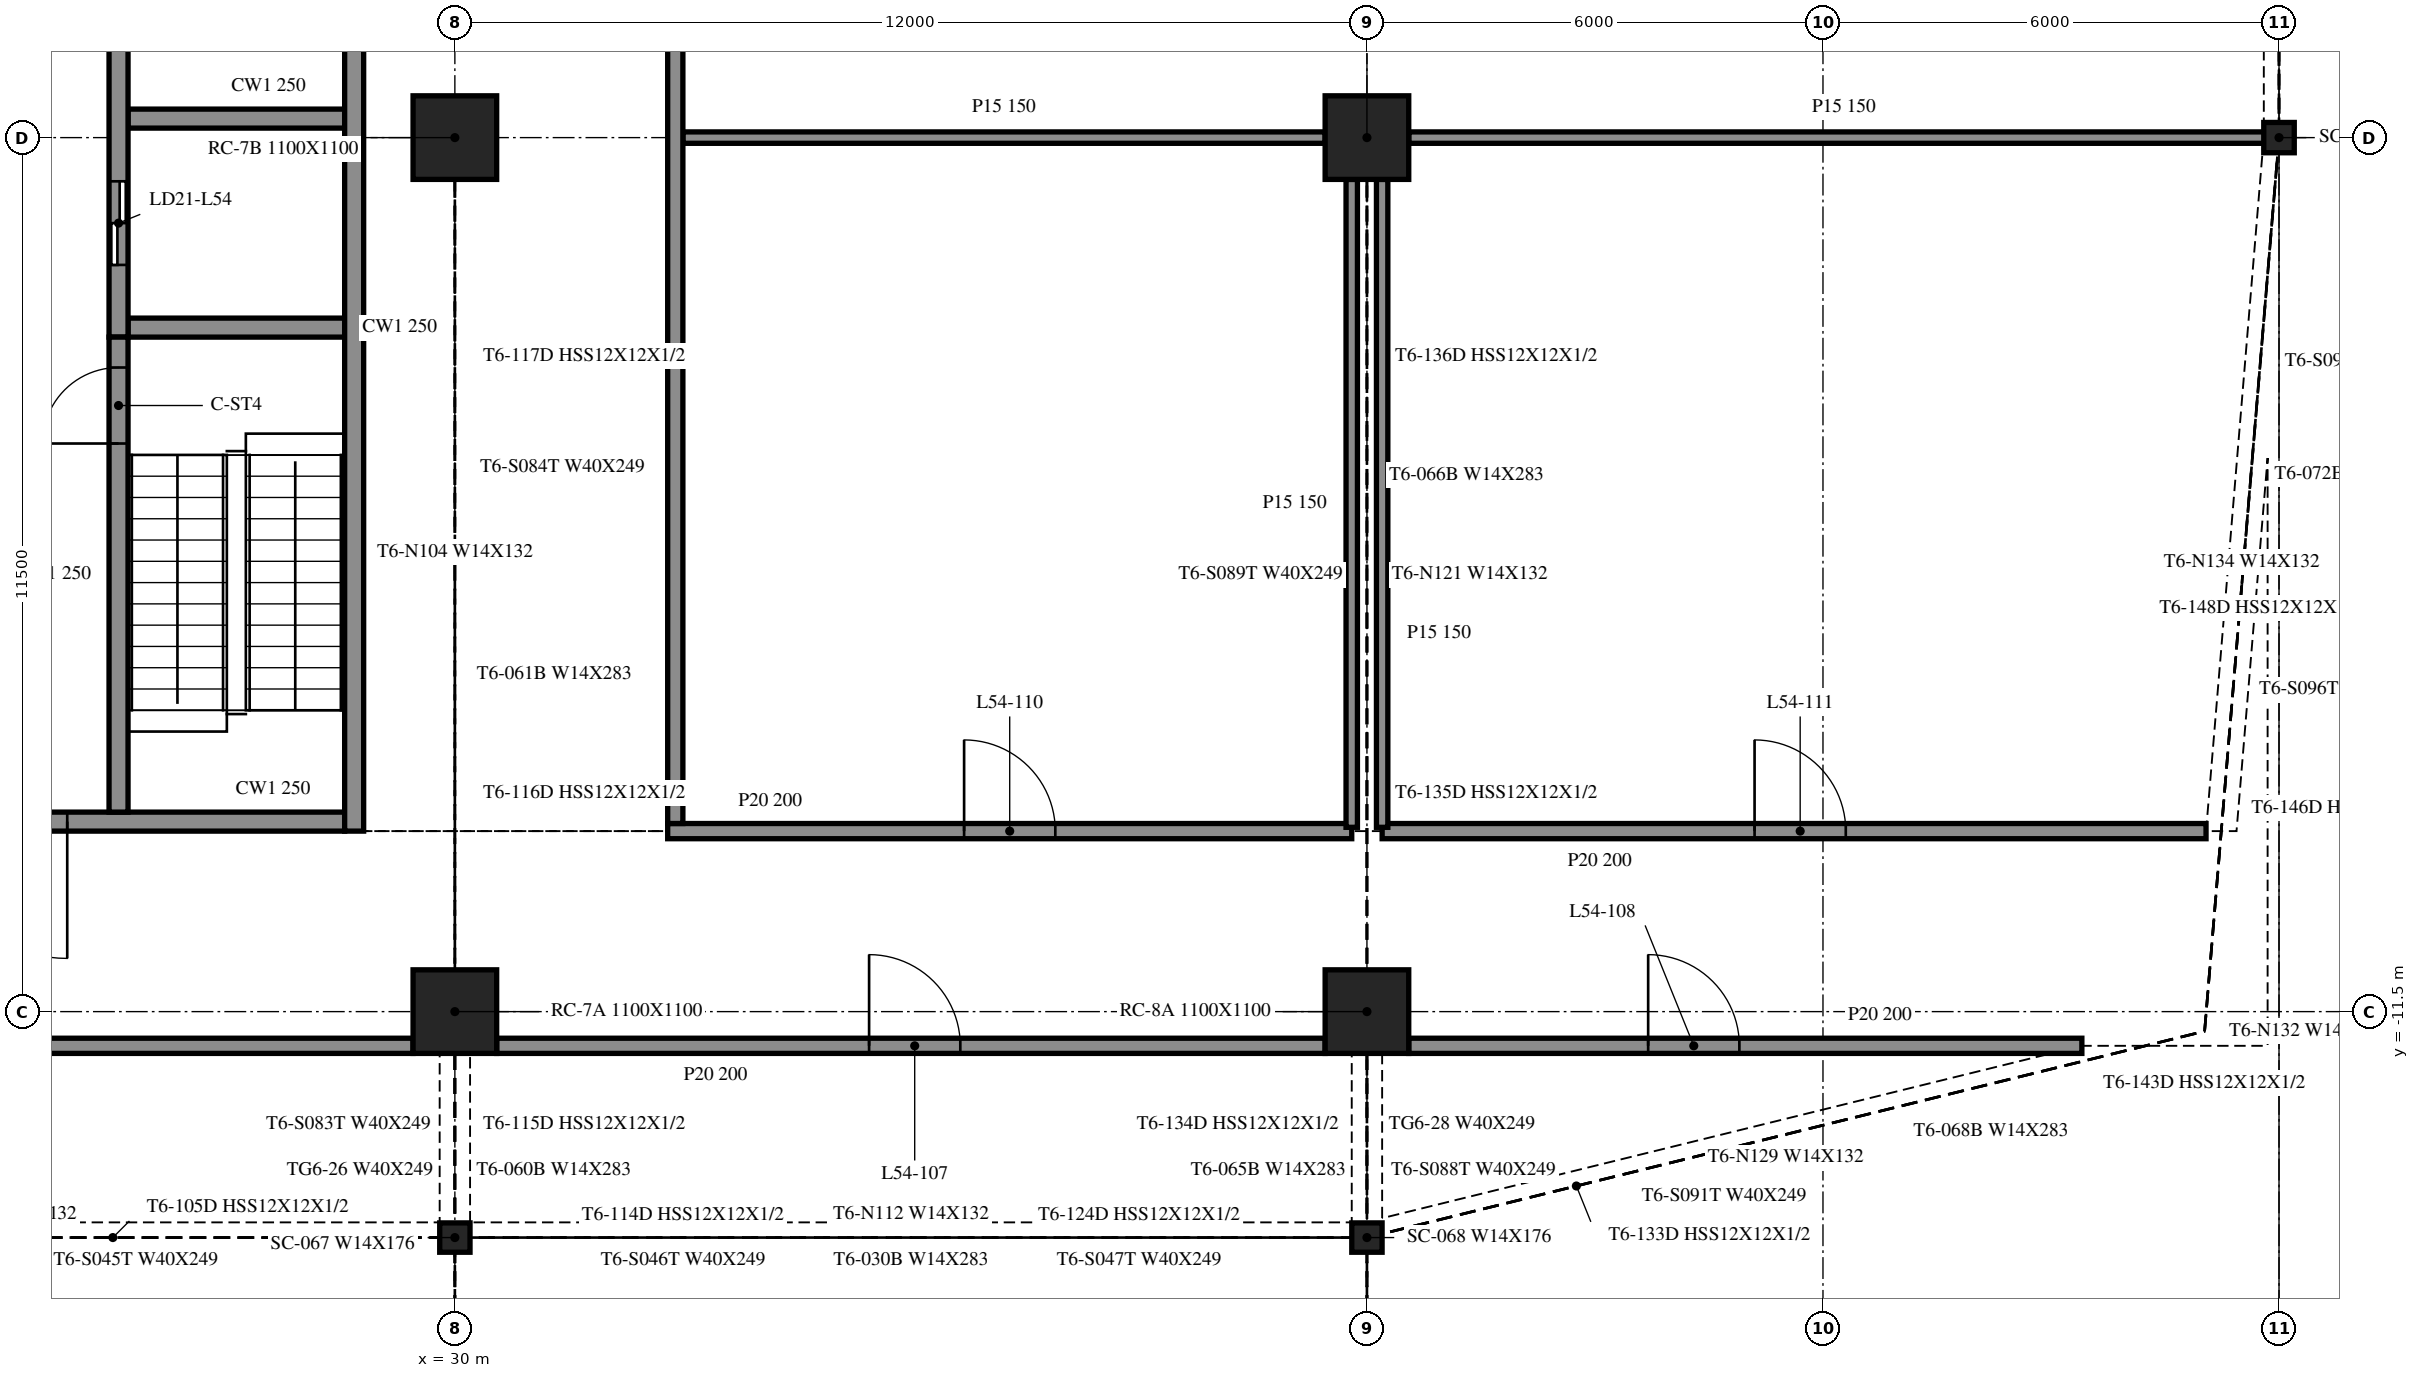
"""IFC4 building model, lengths in metres.
Left out: names, types, materials, properties, quantities, classifications, styles, units other than length and angle.
Written with IfcOpenShell. Run it as: python <this file> out.ifc"""

import sys

from ifc_helpers import new_model, si_unit, direction, frame, frame_2d, origin, origin_2d, place, context, subcontext, project, spatial, rectangle, i_section, extrude, element, fill, save


model = new_model("IFC4")
c1 = context("Model", 3, precision=1e-05, world=origin(), true_north=direction((0.0, 1.0)))
c2 = subcontext(c1, "Body", "Model", "MODEL_VIEW")
j1 = project(units=[si_unit("LENGTHUNIT", "METRE"), si_unit("PLANEANGLEUNIT", "RADIAN")], contexts=[c1])
p1 = place(None, origin())
s1 = spatial("IfcSite", under=j1, at=p1, CompositionType="ELEMENT")
p2 = place(p1, origin())
s2 = spatial("IfcBuilding", under=s1, at=p2, CompositionType="ELEMENT")
p3 = place(p2, frame((0.0, 0.0, 224.3)))
s3 = spatial("IfcBuildingStorey", under=s2, at=p3, CompositionType="ELEMENT", Elevation=224.3)
for number, where, z_axis, x_axis in (
    (1, (30.0, -11.5, -0.4), (0.0, 0.0, 1.0), (1.0, 0.0, 0.0)),
    (2, (30.0, 0.0, -0.4), (0.0, 0.0, 1.0), (1.0, 0.0, 0.0)),
    (3, (42.0, -11.5, -0.4), (0.0, 0.0, 1.0), (1.0, 0.0, 0.0)),
    (4, (42.0, 0.0, -0.4), (0.0, 0.0, 1.0), (1.0, 0.0, 0.0)),
):
    element("IfcColumn", number, at=place(p3, frame(where, z_axis=z_axis, x_axis=x_axis)), inside=s3, PredefinedType="COLUMN", context=c2, shape_type="SweptSolid", body=[
        extrude(rectangle(XDim=1.1, YDim=1.1, at=origin_2d()), origin(), (0.0, 0.0, 1.0), 4.36),
    ])
p4 = place(p3, frame((54.0, 0.0, -0.4), z_axis=(0.0, 0.0, 1.0), x_axis=(1.0, 0.0, 0.0)))
e5 = element("IfcColumn", 5, at=p4, inside=s3, PredefinedType="COLUMN", context=c2, shape_type="SweptSolid", body=[
    extrude(i_section(OverallWidth=0.401, OverallDepth=0.399, WebThickness=0.025, FlangeThickness=0.04, at=origin_2d()), origin(), (0.0, 0.0, 1.0), 4.36),
])
for number, where, z_axis, x_axis in (
    (6, (30.0, -14.473, -0.4), (0.0, 0.0, 1.0), (1.0, 0.0, 0.0)),
    (7, (42.0, -14.473, -0.4), (0.0, 0.0, 1.0), (1.0, 0.0, 0.0)),
):
    element("IfcColumn", number, at=place(p3, frame(where, z_axis=z_axis, x_axis=x_axis)), inside=s3, PredefinedType="COLUMN", context=c2, shape_type="SweptSolid", body=[
        extrude(i_section(OverallWidth=0.399, OverallDepth=0.386, WebThickness=0.021, FlangeThickness=0.033, at=origin_2d()), origin(), (0.0, 0.0, 1.0), 4.36),
    ])
p5 = place(p3, frame((28.675, -9.125, 0.0), z_axis=(0.0, 0.0, 1.0), x_axis=(0.0, 1.0, 0.0)))
e8 = element("IfcWall", 8, at=p5, inside=s3, PredefinedType="SOLIDWALL", context=c2, shape_type="SweptSolid", body=[
    extrude(rectangle(XDim=24.25, YDim=0.25, at=frame_2d((12.125, 0.0))), origin(), (0.0, 0.0, 1.0), 3.96),
])
p6 = place(p5, frame((14.425, 0.0, 0.0)))
e9 = element("IfcOpeningElement", 9, at=p6, cuts=e8, PredefinedType="OPENING", context=c2, shape_type="SweptSolid", body=[
    extrude(rectangle(XDim=0.9, YDim=2.1, at=frame_2d((0.45, 1.05))), frame((0.0, 0.135, 0.0), z_axis=(0.0, -1.0, 0.0), x_axis=(1.0, 0.0, 0.0)), (0.0, 0.0, 1.0), 0.27),
])
p7 = place(p5, frame((19.012, 0.0, 0.0)))
e10 = element("IfcOpeningElement", 10, at=p7, cuts=e8, PredefinedType="OPENING", context=c2, shape_type="SweptSolid", body=[
    extrude(rectangle(XDim=0.9, YDim=2.1, at=frame_2d((0.45, 1.05))), frame((0.0, 0.135, 0.0), z_axis=(0.0, -1.0, 0.0), x_axis=(1.0, 0.0, 0.0)), (0.0, 0.0, 1.0), 0.27),
])
p8 = place(p5, frame((21.492, 0.0, 0.0)))
e11 = element("IfcOpeningElement", 11, at=p8, cuts=e8, PredefinedType="OPENING", context=c2, shape_type="SweptSolid", body=[
    extrude(rectangle(XDim=0.9, YDim=2.1, at=frame_2d((0.45, 1.05))), frame((0.0, 0.135, 0.0), z_axis=(0.0, -1.0, 0.0), x_axis=(1.0, 0.0, 0.0)), (0.0, 0.0, 1.0), 0.27),
])
p9 = place(p3, frame((28.55, -9.0, 0.0), z_axis=(0.0, 0.0, 1.0), x_axis=(-1.0, 0.0, 0.0)))
e12 = element("IfcWall", 12, at=p9, inside=s3, PredefinedType="SOLIDWALL", context=c2, shape_type="SweptSolid", body=[
    extrude(rectangle(XDim=9.1, YDim=0.25, at=frame_2d((4.55, 0.0))), origin(), (0.0, 0.0, 1.0), 3.96),
])
p10 = place(p9, frame((3.65, 0.0, 0.0)))
e13 = element("IfcOpeningElement", 13, at=p10, cuts=e12, PredefinedType="OPENING", context=c2, shape_type="SweptSolid", body=[
    extrude(rectangle(XDim=1.8, YDim=2.1, at=frame_2d((0.9, 1.05))), frame((0.0, 0.135, 0.0), z_axis=(0.0, -1.0, 0.0), x_axis=(1.0, 0.0, 0.0)), (0.0, 0.0, 1.0), 0.27),
])
p11 = place(p3, frame((25.575, -8.875, 0.0), z_axis=(0.0, 0.0, 1.0), x_axis=(0.0, 1.0, 0.0)))
e14 = element("IfcWall", 14, at=p11, inside=s3, PredefinedType="SOLIDWALL", context=c2, shape_type="SweptSolid", body=[
    extrude(rectangle(XDim=6.25, YDim=0.25, at=frame_2d((3.125, 0.0))), origin(), (0.0, 0.0, 1.0), 3.96),
])
p12 = place(p11, frame((4.85, 0.0, 0.0)))
e15 = element("IfcOpeningElement", 15, at=p12, cuts=e14, PredefinedType="OPENING", context=c2, shape_type="SweptSolid", body=[
    extrude(rectangle(XDim=1.0, YDim=2.1, at=frame_2d((0.5, 1.05))), frame((0.0, 0.135, 0.0), z_axis=(0.0, -1.0, 0.0), x_axis=(1.0, 0.0, 0.0)), (0.0, 0.0, 1.0), 0.27),
])
p13 = place(p3, frame((25.575, 14.875, 0.0), z_axis=(0.0, 0.0, 1.0), x_axis=(0.0, -1.0, 0.0)))
e16 = element("IfcWall", 16, at=p13, inside=s3, PredefinedType="SOLIDWALL", context=c2, shape_type="SweptSolid", body=[
    extrude(rectangle(XDim=17.5, YDim=0.25, at=frame_2d((8.75, 0.0))), origin(), (0.0, 0.0, 1.0), 3.96),
])
p14 = place(p13, frame((15.45, 0.0, 0.0)))
e17 = element("IfcOpeningElement", 17, at=p14, cuts=e16, PredefinedType="OPENING", context=c2, shape_type="SweptSolid", body=[
    extrude(rectangle(XDim=1.1, YDim=2.1, at=frame_2d((0.55, 1.05))), frame((0.0, 0.135, 0.0), z_axis=(0.0, -1.0, 0.0), x_axis=(1.0, 0.0, 0.0)), (0.0, 0.0, 1.0), 0.27),
])
p15 = place(p13, frame((12.8, 0.0, 0.0)))
e18 = element("IfcOpeningElement", 18, at=p15, cuts=e16, PredefinedType="OPENING", context=c2, shape_type="SweptSolid", body=[
    extrude(rectangle(XDim=0.9, YDim=2.1, at=frame_2d((0.45, 1.05))), frame((0.0, 0.135, 0.0), z_axis=(0.0, -1.0, 0.0), x_axis=(1.0, 0.0, 0.0)), (0.0, 0.0, 1.0), 0.27),
])
for number, where, z_axis, x_axis in (
    (19, (25.7, -2.5, 0.0), (0.0, 0.0, 1.0), (1.0, 0.0, 0.0)),
    (20, (25.7, 0.25, 0.0), (0.0, 0.0, 1.0), (1.0, 0.0, 0.0)),
):
    element("IfcWall", number, at=place(p3, frame(where, z_axis=z_axis, x_axis=x_axis)), inside=s3, PredefinedType="SOLIDWALL", context=c2, shape_type="SweptSolid", body=[
        extrude(rectangle(XDim=2.85, YDim=0.25, at=frame_2d((1.425, 0.0))), origin(), (0.0, 0.0, 1.0), 3.96),
    ])
p16 = place(p3, frame((18.55, -11.95, 0.0), z_axis=(0.0, 0.0, 1.0), x_axis=(1.0, 0.0, 0.0)))
e21 = element("IfcWall", 21, at=p16, inside=s3, PredefinedType="PARTITIONING", context=c2, shape_type="SweptSolid", body=[
    extrude(rectangle(XDim=10.9, YDim=0.2, at=frame_2d((5.45, 0.0))), origin(), (0.0, 0.0, 1.0), 3.96),
])
p17 = place(p16, frame((4.9, 0.0, 0.0)))
e22 = element("IfcOpeningElement", 22, at=p17, cuts=e21, PredefinedType="OPENING", context=c2, shape_type="SweptSolid", body=[
    extrude(rectangle(XDim=1.0, YDim=2.1, at=frame_2d((0.5, 1.05))), frame((0.0, 0.11, 0.0), z_axis=(0.0, -1.0, 0.0), x_axis=(1.0, 0.0, 0.0)), (0.0, 0.0, 1.0), 0.22),
])
p18 = place(p3, frame((30.55, -11.95, 0.0), z_axis=(0.0, 0.0, 1.0), x_axis=(1.0, 0.0, 0.0)))
e23 = element("IfcWall", 23, at=p18, inside=s3, PredefinedType="PARTITIONING", context=c2, shape_type="SweptSolid", body=[
    extrude(rectangle(XDim=10.9, YDim=0.2, at=frame_2d((5.45, 0.0))), origin(), (0.0, 0.0, 1.0), 3.96),
])
p19 = place(p18, frame((4.9, 0.0, 0.0)))
e24 = element("IfcOpeningElement", 24, at=p19, cuts=e23, PredefinedType="OPENING", context=c2, shape_type="SweptSolid", body=[
    extrude(rectangle(XDim=1.2, YDim=2.1, at=frame_2d((0.6, 1.05))), frame((0.0, 0.11, 0.0), z_axis=(0.0, -1.0, 0.0), x_axis=(1.0, 0.0, 0.0)), (0.0, 0.0, 1.0), 0.22),
])
p20 = place(p3, frame((42.55, -11.95, 0.0), z_axis=(0.0, 0.0, 1.0), x_axis=(1.0, 0.0, 0.0)))
e25 = element("IfcWall", 25, at=p20, inside=s3, PredefinedType="PARTITIONING", context=c2, shape_type="SweptSolid", body=[
    extrude(rectangle(XDim=8.856, YDim=0.2, at=frame_2d((4.428, 0.0))), origin(), (0.0, 0.0, 1.0), 3.96),
])
p21 = place(p20, frame((3.15, 0.0, 0.0)))
e26 = element("IfcOpeningElement", 26, at=p21, cuts=e25, PredefinedType="OPENING", context=c2, shape_type="SweptSolid", body=[
    extrude(rectangle(XDim=1.2, YDim=2.1, at=frame_2d((0.6, 1.05))), frame((0.0, 0.11, 0.0), z_axis=(0.0, -1.0, 0.0), x_axis=(1.0, 0.0, 0.0)), (0.0, 0.0, 1.0), 0.22),
])
p22 = place(p3, frame((32.8, -9.125, 0.0), z_axis=(0.0, 0.0, 1.0), x_axis=(1.0, 0.0, 0.0)))
e27 = element("IfcWall", 27, at=p22, inside=s3, PredefinedType="PARTITIONING", context=c2, shape_type="SweptSolid", body=[
    extrude(rectangle(XDim=9.0, YDim=0.2, at=frame_2d((4.5, 0.0))), origin(), (0.0, 0.0, 1.0), 3.96),
])
p23 = place(p22, frame((3.9, 0.0, 0.0)))
e28 = element("IfcOpeningElement", 28, at=p23, cuts=e27, PredefinedType="OPENING", context=c2, shape_type="SweptSolid", body=[
    extrude(rectangle(XDim=1.2, YDim=2.1, at=frame_2d((0.6, 1.05))), frame((0.0, 0.11, 0.0), z_axis=(0.0, -1.0, 0.0), x_axis=(1.0, 0.0, 0.0)), (0.0, 0.0, 1.0), 0.22),
])
p24 = place(p3, frame((42.2, -9.125, 0.0), z_axis=(0.0, 0.0, 1.0), x_axis=(1.0, 0.0, 0.0)))
e29 = element("IfcWall", 29, at=p24, inside=s3, PredefinedType="PARTITIONING", context=c2, shape_type="SweptSolid", body=[
    extrude(rectangle(XDim=10.84, YDim=0.2, at=frame_2d((5.42, 0.0))), origin(), (0.0, 0.0, 1.0), 3.96),
])
p25 = place(p24, frame((4.9, 0.0, 0.0)))
e30 = element("IfcOpeningElement", 30, at=p25, cuts=e29, PredefinedType="OPENING", context=c2, shape_type="SweptSolid", body=[
    extrude(rectangle(XDim=1.2, YDim=2.1, at=frame_2d((0.6, 1.05))), frame((0.0, 0.11, 0.0), z_axis=(0.0, -1.0, 0.0), x_axis=(1.0, 0.0, 0.0)), (0.0, 0.0, 1.0), 0.22),
])
p26 = place(p3, frame((33.0, 0.0, 0.0), z_axis=(0.0, 0.0, 1.0), x_axis=(1.0, 0.0, 0.0)))
e31 = element("IfcWall", 31, at=p26, inside=s3, PredefinedType="PARTITIONING", context=c2, shape_type="SweptSolid", body=[
    extrude(rectangle(XDim=8.45, YDim=0.15, at=frame_2d((4.225, 0.0))), origin(), (0.0, 0.0, 1.0), 3.96),
])
p27 = place(p3, frame((42.55, 0.0, 0.0), z_axis=(0.0, 0.0, 1.0), x_axis=(1.0, 0.0, 0.0)))
e32 = element("IfcWall", 32, at=p27, inside=s3, PredefinedType="PARTITIONING", context=c2, shape_type="SweptSolid", body=[
    extrude(rectangle(XDim=11.45, YDim=0.15, at=frame_2d((5.725, 0.0))), origin(), (0.0, 0.0, 1.0), 3.96),
])
p28 = place(p3, frame((32.9, -9.025, 0.0), z_axis=(0.0, 0.0, 1.0), x_axis=(0.0, 1.0, 0.0)))
e33 = element("IfcWall", 33, at=p28, inside=s3, PredefinedType="PARTITIONING", context=c2, shape_type="SweptSolid", body=[
    extrude(rectangle(XDim=24.05, YDim=0.2, at=frame_2d((12.025, 0.0))), origin(), (0.0, 0.0, 1.0), 3.96),
])
p29 = place(p28, frame((11.5, 0.0, 0.0)))
e34 = element("IfcOpeningElement", 34, at=p29, cuts=e33, PredefinedType="OPENING", context=c2, shape_type="SweptSolid", body=[
    extrude(rectangle(XDim=1.0, YDim=2.1, at=frame_2d((0.5, 1.05))), frame((0.0, 0.11, 0.0), z_axis=(0.0, -1.0, 0.0), x_axis=(1.0, 0.0, 0.0)), (0.0, 0.0, 1.0), 0.22),
])
for number, where, z_axis, x_axis in (
    (35, (41.8, -9.075, 0.0), (0.0, 0.0, 1.0), (0.0, 1.0, 0.0)),
    (36, (42.2, -9.075, 0.0), (0.0, 0.0, 1.0), (0.0, 1.0, 0.0)),
):
    element("IfcWall", number, at=place(p3, frame(where, z_axis=z_axis, x_axis=x_axis)), inside=s3, PredefinedType="PARTITIONING", context=c2, shape_type="SweptSolid", body=[
        extrude(rectangle(XDim=8.525, YDim=0.15, at=frame_2d((4.262, 0.0))), origin(), (0.0, 0.0, 1.0), 3.96),
    ])
p30 = place(p10, origin())
e37 = element("IfcDoor", 37, at=p30, inside=s3, OperationType="DOUBLE_DOOR_SINGLE_SWING", PredefinedType="DOOR", context=c2, shape_type="SweptSolid", body=[
    extrude(rectangle(XDim=1.8, YDim=2.1, at=frame_2d((0.9, 1.05))), frame((0.0, 0.025, 0.0), z_axis=(0.0, -1.0, 0.0), x_axis=(1.0, 0.0, 0.0)), (0.0, 0.0, 1.0), 0.05),
])
fill(e13, e37)
p31 = place(p14, origin())
e38 = element("IfcDoor", 38, at=p31, inside=s3, OperationType="DOUBLE_DOOR_SLIDING", PredefinedType="DOOR", context=c2, shape_type="SweptSolid", body=[
    extrude(rectangle(XDim=1.1, YDim=2.1, at=frame_2d((0.55, 1.05))), frame((0.0, 0.025, 0.0), z_axis=(0.0, -1.0, 0.0), x_axis=(1.0, 0.0, 0.0)), (0.0, 0.0, 1.0), 0.05),
])
fill(e17, e38)
p32 = place(p12, origin())
e39 = element("IfcDoor", 39, at=p32, inside=s3, OperationType="SINGLE_SWING_RIGHT", PredefinedType="DOOR", context=c2, shape_type="SweptSolid", body=[
    extrude(rectangle(XDim=1.0, YDim=2.1, at=frame_2d((0.5, 1.05))), frame((0.0, 0.025, 0.0), z_axis=(0.0, -1.0, 0.0), x_axis=(1.0, 0.0, 0.0)), (0.0, 0.0, 1.0), 0.05),
])
fill(e15, e39)
p33 = place(p19, origin())
e40 = element("IfcDoor", 40, at=p33, inside=s3, OperationType="SINGLE_SWING_LEFT", PredefinedType="DOOR", context=c2, shape_type="SweptSolid", body=[
    extrude(rectangle(XDim=1.2, YDim=2.1, at=frame_2d((0.6, 1.05))), frame((0.0, 0.025, 0.0), z_axis=(0.0, -1.0, 0.0), x_axis=(1.0, 0.0, 0.0)), (0.0, 0.0, 1.0), 0.05),
])
fill(e24, e40)
p34 = place(p21, origin())
e41 = element("IfcDoor", 41, at=p34, inside=s3, OperationType="SINGLE_SWING_RIGHT", PredefinedType="DOOR", context=c2, shape_type="SweptSolid", body=[
    extrude(rectangle(XDim=1.2, YDim=2.1, at=frame_2d((0.6, 1.05))), frame((0.0, 0.025, 0.0), z_axis=(0.0, -1.0, 0.0), x_axis=(1.0, 0.0, 0.0)), (0.0, 0.0, 1.0), 0.05),
])
fill(e26, e41)
p35 = place(p23, origin())
e42 = element("IfcDoor", 42, at=p35, inside=s3, OperationType="SINGLE_SWING_LEFT", PredefinedType="DOOR", context=c2, shape_type="SweptSolid", body=[
    extrude(rectangle(XDim=1.2, YDim=2.1, at=frame_2d((0.6, 1.05))), frame((0.0, 0.025, 0.0), z_axis=(0.0, -1.0, 0.0), x_axis=(1.0, 0.0, 0.0)), (0.0, 0.0, 1.0), 0.05),
])
fill(e28, e42)
p36 = place(p25, origin())
e43 = element("IfcDoor", 43, at=p36, inside=s3, OperationType="SINGLE_SWING_RIGHT", PredefinedType="DOOR", context=c2, shape_type="SweptSolid", body=[
    extrude(rectangle(XDim=1.2, YDim=2.1, at=frame_2d((0.6, 1.05))), frame((0.0, 0.025, 0.0), z_axis=(0.0, -1.0, 0.0), x_axis=(1.0, 0.0, 0.0)), (0.0, 0.0, 1.0), 0.05),
])
fill(e30, e43)
save(model, sys.argv[1])
